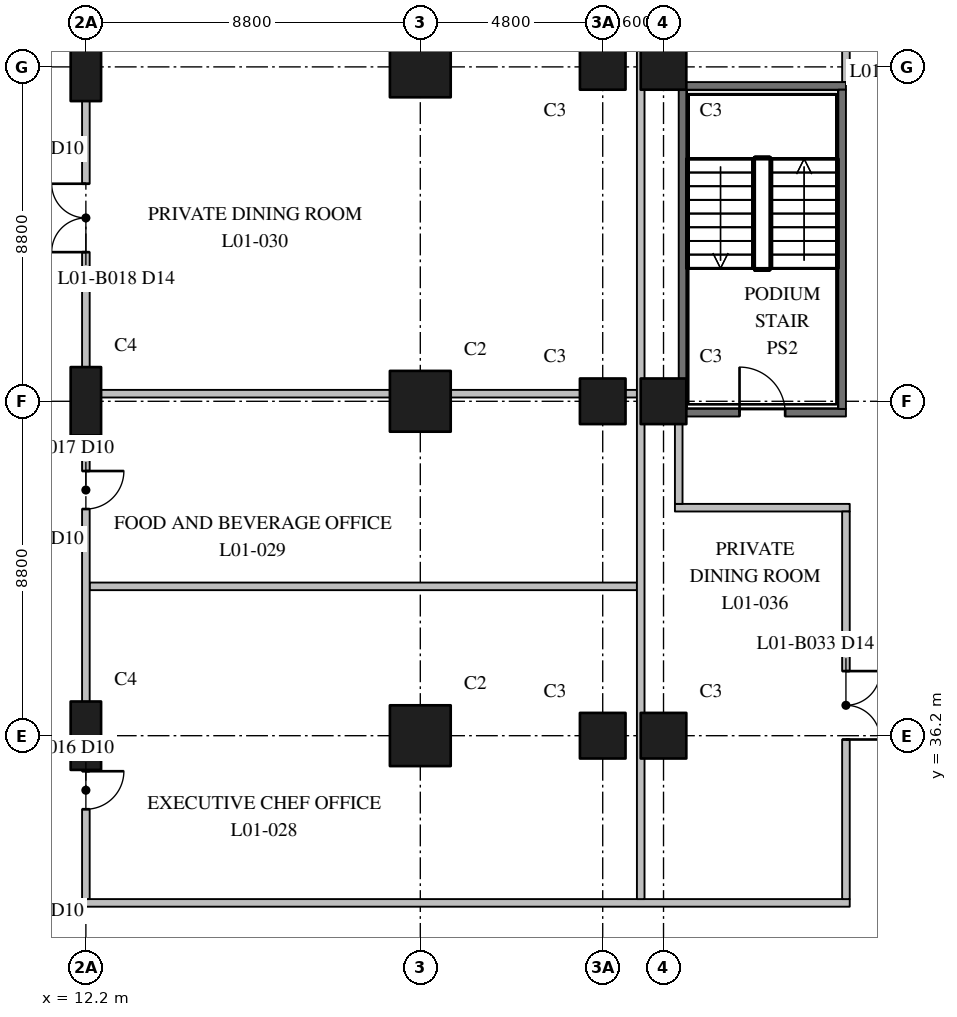
"""IFC4 building model, lengths in metres.
Left out: names, types, materials, properties, quantities, classifications, styles, units other than length and angle.
Written with IfcOpenShell. Run it as: python <this file> out.ifc"""

import sys

from ifc_helpers import new_model, si_unit, direction, frame, frame_2d, origin, origin_2d, place, context, subcontext, project, spatial, rectangle, extrude, element, fill, save


model = new_model("IFC4")
c1 = context("Model", 3, precision=1e-05, world=origin(), true_north=direction((0.0, 1.0)))
c2 = subcontext(c1, "Body", "Model", "MODEL_VIEW")
j1 = project(units=[si_unit("LENGTHUNIT", "METRE"), si_unit("PLANEANGLEUNIT", "RADIAN")], contexts=[c1])
p1 = place(None, origin())
s1 = spatial("IfcSite", under=j1, at=p1, CompositionType="ELEMENT")
p2 = place(p1, origin())
s2 = spatial("IfcBuilding", under=s1, at=p2, CompositionType="ELEMENT")
p3 = place(p2, frame((0.0, 0.0, 7.5)))
s3 = spatial("IfcBuildingStorey", under=s2, at=p3, CompositionType="ELEMENT", Elevation=7.5)
for number, where, z_axis, x_axis in (
    (1, (12.2, 36.2, 0.0), (0.0, 0.0, 1.0), (0.0, 1.0, 0.0)),
    (2, (12.2, 45.0, 0.0), (0.0, 0.0, 1.0), (0.0, 1.0, 0.0)),
    (3, (12.2, 53.8, 0.0), (0.0, 0.0, 1.0), (0.0, 1.0, 0.0)),
):
    element("IfcColumn", number, at=place(p3, frame(where, z_axis=z_axis, x_axis=x_axis)), inside=s3, PredefinedType="COLUMN", context=c2, shape_type="SweptSolid", body=[
        extrude(rectangle(XDim=1.8, YDim=0.8, at=origin_2d()), origin(), (0.0, 0.0, 1.0), 5.5),
    ])
for number, where, z_axis, x_axis in (
    (4, (21.0, 36.2, 0.0), (0.0, 0.0, 1.0), (1.0, 0.0, 0.0)),
    (5, (21.0, 45.0, 0.0), (0.0, 0.0, 1.0), (1.0, 0.0, 0.0)),
    (6, (21.0, 53.8, 0.0), (0.0, 0.0, 1.0), (1.0, 0.0, 0.0)),
):
    element("IfcColumn", number, at=place(p3, frame(where, z_axis=z_axis, x_axis=x_axis)), inside=s3, PredefinedType="COLUMN", context=c2, shape_type="SweptSolid", body=[
        extrude(rectangle(XDim=1.6, YDim=1.6, at=origin_2d()), origin(), (0.0, 0.0, 1.0), 5.5),
    ])
for number, where, z_axis, x_axis in (
    (7, (25.8, 36.2, 0.0), (0.0, 0.0, 1.0), (1.0, 0.0, 0.0)),
    (8, (25.8, 45.0, 0.0), (0.0, 0.0, 1.0), (1.0, 0.0, 0.0)),
    (9, (25.8, 53.8, 0.0), (0.0, 0.0, 1.0), (1.0, 0.0, 0.0)),
    (10, (27.4, 36.2, 0.0), (0.0, 0.0, 1.0), (1.0, 0.0, 0.0)),
    (11, (27.4, 45.0, 0.0), (0.0, 0.0, 1.0), (1.0, 0.0, 0.0)),
    (12, (27.4, 53.8, 0.0), (0.0, 0.0, 1.0), (1.0, 0.0, 0.0)),
):
    element("IfcColumn", number, at=place(p3, frame(where, z_axis=z_axis, x_axis=x_axis)), inside=s3, PredefinedType="COLUMN", context=c2, shape_type="SweptSolid", body=[
        extrude(rectangle(XDim=1.2, YDim=1.2, at=origin_2d()), origin(), (0.0, 0.0, 1.0), 5.5),
    ])
p4 = place(p3, frame((27.8, 44.7, 0.0), z_axis=(0.0, 0.0, 1.0), x_axis=(1.0, 0.0, 0.0)))
e13 = element("IfcWall", 13, at=p4, inside=s3, PredefinedType="SHEAR", context=c2, shape_type="SweptSolid", body=[
    extrude(rectangle(XDim=4.4, YDim=0.2, at=frame_2d((2.2, 0.0))), origin(), (0.0, 0.0, 1.0), 5.1),
])
p5 = place(p4, frame((1.6, 0.0, 0.0)))
e14 = element("IfcOpeningElement", 14, at=p5, cuts=e13, PredefinedType="OPENING", context=c2, shape_type="SweptSolid", body=[
    extrude(rectangle(XDim=1.2, YDim=2.1, at=frame_2d((0.6, 1.05))), frame((0.0, 0.11, 0.0), z_axis=(0.0, -1.0, 0.0), x_axis=(1.0, 0.0, 0.0)), (0.0, 0.0, 1.0), 0.22),
])
p6 = place(p3, frame((27.8, 53.3, 0.0), z_axis=(0.0, 0.0, 1.0), x_axis=(1.0, 0.0, 0.0)))
e15 = element("IfcWall", 15, at=p6, inside=s3, PredefinedType="SHEAR", context=c2, shape_type="SweptSolid", body=[
    extrude(rectangle(XDim=4.4, YDim=0.2, at=frame_2d((2.2, 0.0))), origin(), (0.0, 0.0, 1.0), 5.1),
])
for number, where, z_axis, x_axis in (
    (16, (27.9, 44.8, 0.0), (0.0, 0.0, 1.0), (0.0, 1.0, 0.0)),
    (17, (32.1, 44.8, 0.0), (0.0, 0.0, 1.0), (0.0, 1.0, 0.0)),
):
    element("IfcWall", number, at=place(p3, frame(where, z_axis=z_axis, x_axis=x_axis)), inside=s3, PredefinedType="SHEAR", context=c2, shape_type="SweptSolid", body=[
        extrude(rectangle(XDim=8.4, YDim=0.2, at=frame_2d((4.2, 0.0))), origin(), (0.0, 0.0, 1.0), 5.1),
    ])
p7 = place(p3, frame((12.1, 31.8, 0.0), z_axis=(0.0, 0.0, 1.0), x_axis=(1.0, 0.0, 0.0)))
e18 = element("IfcWall", 18, at=p7, inside=s3, PredefinedType="PARTITIONING", context=c2, shape_type="SweptSolid", body=[
    extrude(rectangle(XDim=20.2, YDim=0.2, at=frame_2d((10.1, 0.0))), origin(), (0.0, 0.0, 1.0), 5.1),
])
p8 = place(p3, frame((27.7, 42.2, 0.0), z_axis=(0.0, 0.0, 1.0), x_axis=(1.0, 0.0, 0.0)))
e19 = element("IfcWall", 19, at=p8, inside=s3, PredefinedType="PARTITIONING", context=c2, shape_type="SweptSolid", body=[
    extrude(rectangle(XDim=4.6, YDim=0.2, at=frame_2d((2.3, 0.0))), origin(), (0.0, 0.0, 1.0), 5.1),
])
for number, where, z_axis, x_axis in (
    (20, (12.3, 40.13, 0.0), (0.0, 0.0, 1.0), (1.0, 0.0, 0.0)),
    (21, (12.3, 45.2, 0.0), (0.0, 0.0, 1.0), (1.0, 0.0, 0.0)),
):
    element("IfcWall", number, at=place(p3, frame(where, z_axis=z_axis, x_axis=x_axis)), inside=s3, PredefinedType="PARTITIONING", context=c2, shape_type="SweptSolid", body=[
        extrude(rectangle(XDim=14.4, YDim=0.2, at=frame_2d((7.2, 0.0))), origin(), (0.0, 0.0, 1.0), 5.1),
    ])
p9 = place(p3, frame((12.2, 31.9, 0.0), z_axis=(0.0, 0.0, 1.0), x_axis=(0.0, 1.0, 0.0)))
e22 = element("IfcWall", 22, at=p9, inside=s3, PredefinedType="PARTITIONING", context=c2, shape_type="SweptSolid", body=[
    extrude(rectangle(XDim=46.3, YDim=0.2, at=frame_2d((23.15, 0.0))), origin(), (0.0, 0.0, 1.0), 5.1),
])
p10 = place(p9, frame((2.365, 0.0, 0.0)))
e23 = element("IfcOpeningElement", 23, at=p10, cuts=e22, PredefinedType="OPENING", context=c2, shape_type="SweptSolid", body=[
    extrude(rectangle(XDim=1.0, YDim=2.1, at=frame_2d((0.5, 1.05))), frame((0.0, 0.11, 0.0), z_axis=(0.0, -1.0, 0.0), x_axis=(1.0, 0.0, 0.0)), (0.0, 0.0, 1.0), 0.22),
])
p11 = place(p9, frame((10.265, 0.0, 0.0)))
e24 = element("IfcOpeningElement", 24, at=p11, cuts=e22, PredefinedType="OPENING", context=c2, shape_type="SweptSolid", body=[
    extrude(rectangle(XDim=1.0, YDim=2.1, at=frame_2d((0.5, 1.05))), frame((0.0, 0.11, 0.0), z_axis=(0.0, -1.0, 0.0), x_axis=(1.0, 0.0, 0.0)), (0.0, 0.0, 1.0), 0.22),
])
p12 = place(p9, frame((17.025, 0.0, 0.0)))
e25 = element("IfcOpeningElement", 25, at=p12, cuts=e22, PredefinedType="OPENING", context=c2, shape_type="SweptSolid", body=[
    extrude(rectangle(XDim=1.8, YDim=2.4, at=frame_2d((0.9, 1.2))), frame((0.0, 0.11, 0.0), z_axis=(0.0, -1.0, 0.0), x_axis=(1.0, 0.0, 0.0)), (0.0, 0.0, 1.0), 0.22),
])
p13 = place(p9, frame((27.665, 0.0, 0.0)))
e26 = element("IfcOpeningElement", 26, at=p13, cuts=e22, PredefinedType="OPENING", context=c2, shape_type="SweptSolid", body=[
    extrude(rectangle(XDim=1.8, YDim=2.4, at=frame_2d((0.9, 1.2))), frame((0.0, 0.11, 0.0), z_axis=(0.0, -1.0, 0.0), x_axis=(1.0, 0.0, 0.0)), (0.0, 0.0, 1.0), 0.22),
])
p14 = place(p9, frame((36.815, 0.0, 0.0)))
e27 = element("IfcOpeningElement", 27, at=p14, cuts=e22, PredefinedType="OPENING", context=c2, shape_type="SweptSolid", body=[
    extrude(rectangle(XDim=1.0, YDim=2.1, at=frame_2d((0.5, 1.05))), frame((0.0, 0.11, 0.0), z_axis=(0.0, -1.0, 0.0), x_axis=(1.0, 0.0, 0.0)), (0.0, 0.0, 1.0), 0.22),
])
p15 = place(p9, frame((42.275, 0.0, 0.0)))
e28 = element("IfcOpeningElement", 28, at=p15, cuts=e22, PredefinedType="OPENING", context=c2, shape_type="SweptSolid", body=[
    extrude(rectangle(XDim=1.8, YDim=2.1, at=frame_2d((0.9, 1.05))), frame((0.0, 0.11, 0.0), z_axis=(0.0, -1.0, 0.0), x_axis=(1.0, 0.0, 0.0)), (0.0, 0.0, 1.0), 0.22),
])
p16 = place(p3, frame((32.2, 31.9, 0.0), z_axis=(0.0, 0.0, 1.0), x_axis=(0.0, 1.0, 0.0)))
e29 = element("IfcWall", 29, at=p16, inside=s3, PredefinedType="PARTITIONING", context=c2, shape_type="SweptSolid", body=[
    extrude(rectangle(XDim=10.2, YDim=0.2, at=frame_2d((5.1, 0.0))), origin(), (0.0, 0.0, 1.0), 5.1),
])
p17 = place(p16, frame((4.2, 0.0, 0.0)))
e30 = element("IfcOpeningElement", 30, at=p17, cuts=e29, PredefinedType="OPENING", context=c2, shape_type="SweptSolid", body=[
    extrude(rectangle(XDim=1.8, YDim=2.4, at=frame_2d((0.9, 1.2))), frame((0.0, 0.11, 0.0), z_axis=(0.0, -1.0, 0.0), x_axis=(1.0, 0.0, 0.0)), (0.0, 0.0, 1.0), 0.22),
])
p18 = place(p3, frame((32.2, 53.4, 0.0), z_axis=(0.0, 0.0, 1.0), x_axis=(0.0, 1.0, 0.0)))
e31 = element("IfcWall", 31, at=p18, inside=s3, PredefinedType="PARTITIONING", context=c2, shape_type="SweptSolid", body=[
    extrude(rectangle(XDim=1.2, YDim=0.2, at=frame_2d((0.6, 0.0))), origin(), (0.0, 0.0, 1.0), 5.1),
])
p19 = place(p3, frame((27.8, 42.3, 0.0), z_axis=(0.0, 0.0, 1.0), x_axis=(0.0, 1.0, 0.0)))
e32 = element("IfcWall", 32, at=p19, inside=s3, PredefinedType="PARTITIONING", context=c2, shape_type="SweptSolid", body=[
    extrude(rectangle(XDim=2.3, YDim=0.2, at=frame_2d((1.15, 0.0))), origin(), (0.0, 0.0, 1.0), 5.1),
])
p20 = place(p3, frame((26.8, 31.9, 0.0), z_axis=(0.0, 0.0, 1.0), x_axis=(0.0, 1.0, 0.0)))
e33 = element("IfcWall", 33, at=p20, inside=s3, PredefinedType="PARTITIONING", context=c2, shape_type="SweptSolid", body=[
    extrude(rectangle(XDim=22.7, YDim=0.2, at=frame_2d((11.35, 0.0))), origin(), (0.0, 0.0, 1.0), 5.1),
])
p21 = place(p5, origin())
e34 = element("IfcDoor", 34, at=p21, inside=s3, OperationType="SINGLE_SWING_LEFT", PredefinedType="DOOR", context=c2, shape_type="SweptSolid", body=[
    extrude(rectangle(XDim=1.2, YDim=2.1, at=frame_2d((0.6, 1.05))), frame((0.0, 0.025, 0.0), z_axis=(0.0, -1.0, 0.0), x_axis=(1.0, 0.0, 0.0)), (0.0, 0.0, 1.0), 0.05),
])
fill(e14, e34)
p22 = place(p10, frame((1.0, 0.0, 0.0), z_axis=(0.0, 0.0, 1.0), x_axis=(-1.0, 0.0, 0.0)))
e35 = element("IfcDoor", 35, at=p22, inside=s3, OperationType="SINGLE_SWING_RIGHT", PredefinedType="DOOR", context=c2, shape_type="SweptSolid", body=[
    extrude(rectangle(XDim=1.0, YDim=2.1, at=frame_2d((0.5, 1.05))), frame((0.0, 0.025, 0.0), z_axis=(0.0, -1.0, 0.0), x_axis=(1.0, 0.0, 0.0)), (0.0, 0.0, 1.0), 0.05),
])
fill(e23, e35)
p23 = place(p11, frame((1.0, 0.0, 0.0), z_axis=(0.0, 0.0, 1.0), x_axis=(-1.0, 0.0, 0.0)))
e36 = element("IfcDoor", 36, at=p23, inside=s3, OperationType="SINGLE_SWING_RIGHT", PredefinedType="DOOR", context=c2, shape_type="SweptSolid", body=[
    extrude(rectangle(XDim=1.0, YDim=2.1, at=frame_2d((0.5, 1.05))), frame((0.0, 0.025, 0.0), z_axis=(0.0, -1.0, 0.0), x_axis=(1.0, 0.0, 0.0)), (0.0, 0.0, 1.0), 0.05),
])
fill(e24, e36)
p24 = place(p12, origin())
e37 = element("IfcDoor", 37, at=p24, inside=s3, OperationType="DOUBLE_DOOR_SINGLE_SWING", PredefinedType="DOOR", context=c2, shape_type="SweptSolid", body=[
    extrude(rectangle(XDim=1.8, YDim=2.4, at=frame_2d((0.9, 1.2))), frame((0.0, 0.025, 0.0), z_axis=(0.0, -1.0, 0.0), x_axis=(1.0, 0.0, 0.0)), (0.0, 0.0, 1.0), 0.05),
])
fill(e25, e37)
p25 = place(p17, frame((1.8, 0.0, 0.0), z_axis=(0.0, 0.0, 1.0), x_axis=(-1.0, 0.0, 0.0)))
e38 = element("IfcDoor", 38, at=p25, inside=s3, OperationType="DOUBLE_DOOR_SINGLE_SWING", PredefinedType="DOOR", context=c2, shape_type="SweptSolid", body=[
    extrude(rectangle(XDim=1.8, YDim=2.4, at=frame_2d((0.9, 1.2))), frame((0.0, 0.025, 0.0), z_axis=(0.0, -1.0, 0.0), x_axis=(1.0, 0.0, 0.0)), (0.0, 0.0, 1.0), 0.05),
])
fill(e30, e38)
save(model, sys.argv[1])
